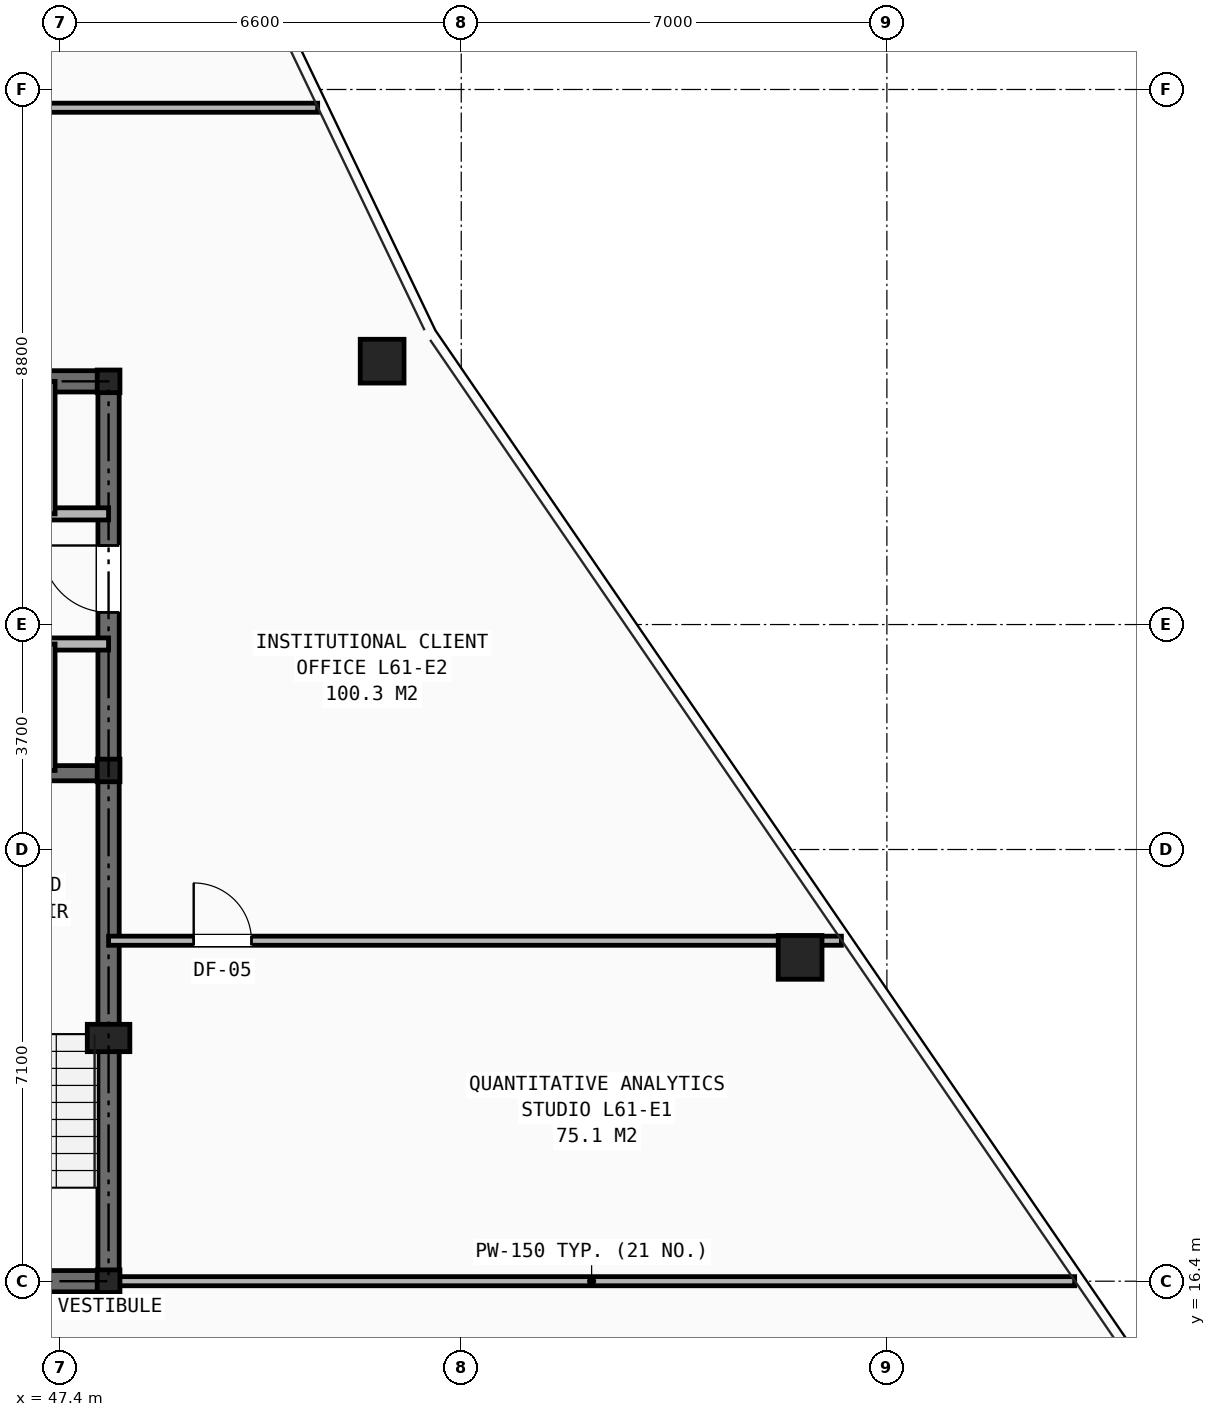
"""IFC4 building model, lengths in metres.
Left out: names, types, materials, properties, quantities, classifications, styles, units other than length and angle.
Written with IfcOpenShell. Run it as: python <this file> out.ifc"""

import sys

from ifc_helpers import new_model, si_unit, direction, frame, frame_2d, origin, origin_2d, place, context, subcontext, project, spatial, rectangle, hollow_rectangle, i_section, extrude, element, fill, save


model = new_model("IFC4")
c1 = context("Model", 3, precision=1e-05, world=origin(), true_north=direction((0.0, 1.0)))
c2 = subcontext(c1, "Body", "Model", "MODEL_VIEW")
j1 = project(units=[si_unit("LENGTHUNIT", "METRE"), si_unit("PLANEANGLEUNIT", "RADIAN")], contexts=[c1])
p1 = place(None, origin())
s1 = spatial("IfcSite", under=j1, at=p1, CompositionType="ELEMENT")
p2 = place(p1, origin())
s2 = spatial("IfcBuilding", under=s1, at=p2, CompositionType="ELEMENT")
p3 = place(p2, frame((0.0, 0.0, 215.4)))
s3 = spatial("IfcBuildingStorey", under=s2, at=p3, CompositionType="ELEMENT", Elevation=215.4)
for number, where, z_axis, x_axis in (
    (1, (48.2, 16.4, 0.0), (0.0, 0.0, 1.0), (1.0, 0.0, 0.0)),
    (2, (48.2, 24.8, 0.0), (0.0, 0.0, 1.0), (1.0, 0.0, 0.0)),
    (3, (48.2, 31.2, 0.0), (0.0, 0.0, 1.0), (1.0, 0.0, 0.0)),
):
    element("IfcColumn", number, at=place(p3, frame(where, z_axis=z_axis, x_axis=x_axis)), inside=s3, PredefinedType="COLUMN", context=c2, shape_type="SweptSolid", body=[
        extrude(i_section(OverallWidth=0.374, OverallDepth=0.372, WebThickness=0.016, FlangeThickness=0.026, at=origin_2d()), origin(), (0.0, 0.0, 1.0), 3.5),
    ])
p4 = place(p3, frame((48.2, 20.4, 0.0), z_axis=(0.0, 0.0, 1.0), x_axis=(1.0, 0.0, 0.0)))
e4 = element("IfcColumn", 4, at=p4, inside=s3, PredefinedType="PILASTER", context=c2, shape_type="SweptSolid", body=[
    extrude(rectangle(XDim=0.7, YDim=0.45, at=origin_2d()), origin(), (0.0, 0.0, 1.0), 3.5),
])
for number, where, z_axis, x_axis in (
    (5, (59.573, 21.726, 0.0), (0.0, 0.0, 1.0), (1.0, 0.0, 0.0)),
    (6, (52.699, 31.532, 0.0), (0.0, 0.0, 1.0), (1.0, 0.0, 0.0)),
):
    element("IfcColumn", number, at=place(p3, frame(where, z_axis=z_axis, x_axis=x_axis)), inside=s3, PredefinedType="COLUMN", context=c2, shape_type="SweptSolid", body=[
        extrude(hollow_rectangle(XDim=0.72, YDim=0.72, WallThickness=0.05, at=origin_2d()), origin(), (0.0, 0.0, 1.0), 3.5),
    ])
p5 = place(p3, frame((31.8, 16.4, 0.0), z_axis=(0.0, 0.0, 1.0), x_axis=(1.0, 0.0, 0.0)))
e7 = element("IfcWall", 7, at=p5, inside=s3, PredefinedType="SHEAR", context=c2, shape_type="SweptSolid", body=[
    extrude(rectangle(XDim=16.4, YDim=0.35, at=frame_2d((8.2, 0.0))), origin(), (0.0, 0.0, 1.0), 3.25),
])
p6 = place(p5, frame((7.75, 0.0, 0.0)))
e8 = element("IfcOpeningElement", 8, at=p6, cuts=e7, PredefinedType="OPENING", context=c2, shape_type="SweptSolid", body=[
    extrude(rectangle(XDim=0.9, YDim=2.1, at=frame_2d((0.45, 1.05))), frame((0.0, 0.185, 0.0), z_axis=(0.0, -1.0, 0.0), x_axis=(1.0, 0.0, 0.0)), (0.0, 0.0, 1.0), 0.37),
])
p7 = place(p5, frame((4.2, 0.0, 0.0)))
e9 = element("IfcOpeningElement", 9, at=p7, cuts=e7, PredefinedType="OPENING", context=c2, shape_type="SweptSolid", body=[
    extrude(rectangle(XDim=0.95, YDim=2.1, at=frame_2d((0.475, 1.05))), frame((0.0, 0.185, 0.0), z_axis=(0.0, -1.0, 0.0), x_axis=(1.0, 0.0, 0.0)), (0.0, 0.0, 1.0), 0.37),
])
p8 = place(p5, frame((10.6, 0.0, 0.0)))
e10 = element("IfcOpeningElement", 10, at=p8, cuts=e7, PredefinedType="OPENING", context=c2, shape_type="SweptSolid", body=[
    extrude(rectangle(XDim=0.95, YDim=2.1, at=frame_2d((0.475, 1.05))), frame((0.0, 0.185, 0.0), z_axis=(0.0, -1.0, 0.0), x_axis=(1.0, 0.0, 0.0)), (0.0, 0.0, 1.0), 0.37),
])
p9 = place(p3, frame((31.8, 31.2, 0.0), z_axis=(0.0, 0.0, 1.0), x_axis=(1.0, 0.0, 0.0)))
e11 = element("IfcWall", 11, at=p9, inside=s3, PredefinedType="SHEAR", context=c2, shape_type="SweptSolid", body=[
    extrude(rectangle(XDim=16.4, YDim=0.35, at=frame_2d((8.2, 0.0))), origin(), (0.0, 0.0, 1.0), 3.25),
])
p10 = place(p3, frame((48.2, 16.4, 0.0), z_axis=(0.0, 0.0, 1.0), x_axis=(0.0, 1.0, 0.0)))
e12 = element("IfcWall", 12, at=p10, inside=s3, PredefinedType="SHEAR", context=c2, shape_type="SweptSolid", body=[
    extrude(rectangle(XDim=14.8, YDim=0.35, at=frame_2d((7.4, 0.0))), origin(), (0.0, 0.0, 1.0), 3.25),
])
p11 = place(p10, frame((11.0, 0.0, 0.0)))
e13 = element("IfcOpeningElement", 13, at=p11, cuts=e12, PredefinedType="OPENING", context=c2, shape_type="SweptSolid", body=[
    extrude(rectangle(XDim=1.1, YDim=2.15, at=frame_2d((0.55, 1.075))), frame((0.0, 0.185, 0.0), z_axis=(0.0, -1.0, 0.0), x_axis=(1.0, 0.0, 0.0)), (0.0, 0.0, 1.0), 0.37),
])
p12 = place(p3, frame((44.955, 24.755, 0.0), z_axis=(0.0, 0.0, 1.0), x_axis=(1.0, 0.0, 0.0)))
e14 = element("IfcWall", 14, at=p12, inside=s3, PredefinedType="SHEAR", context=c2, shape_type="SweptSolid", body=[
    extrude(rectangle(XDim=3.245, YDim=0.25, at=frame_2d((1.623, 0.0))), origin(), (0.0, 0.0, 1.0), 3.25),
])
p13 = place(p3, frame((31.8, 29.02, 0.0), z_axis=(0.0, 0.0, 1.0), x_axis=(1.0, 0.0, 0.0)))
e15 = element("IfcWall", 15, at=p13, inside=s3, PredefinedType="SOLIDWALL", context=c2, shape_type="SweptSolid", body=[
    extrude(rectangle(XDim=16.4, YDim=0.2, at=frame_2d((8.2, 0.0))), origin(), (0.0, 0.0, 1.0), 2.705),
])
p14 = place(p13, frame((0.55, 0.0, 0.0)))
e16 = element("IfcOpeningElement", 16, at=p14, cuts=e15, PredefinedType="OPENING", context=c2, shape_type="SweptSolid", body=[
    extrude(rectangle(XDim=0.85, YDim=2.05, at=frame_2d((0.425, 1.025))), frame((0.0, 0.11, 0.0), z_axis=(0.0, -1.0, 0.0), x_axis=(1.0, 0.0, 0.0)), (0.0, 0.0, 1.0), 0.22),
])
p15 = place(p13, frame((5.94, 0.0, 0.0)))
e17 = element("IfcOpeningElement", 17, at=p15, cuts=e15, PredefinedType="OPENING", context=c2, shape_type="SweptSolid", body=[
    extrude(rectangle(XDim=0.9, YDim=2.1, at=frame_2d((0.45, 1.05))), frame((0.0, 0.11, 0.0), z_axis=(0.0, -1.0, 0.0), x_axis=(1.0, 0.0, 0.0)), (0.0, 0.0, 1.0), 0.22),
])
p16 = place(p13, frame((11.41, 0.0, 0.0)))
e18 = element("IfcOpeningElement", 18, at=p16, cuts=e15, PredefinedType="OPENING", context=c2, shape_type="SweptSolid", body=[
    extrude(rectangle(XDim=1.1, YDim=2.15, at=frame_2d((0.55, 1.075))), frame((0.0, 0.11, 0.0), z_axis=(0.0, -1.0, 0.0), x_axis=(1.0, 0.0, 0.0)), (0.0, 0.0, 1.0), 0.22),
])
p17 = place(p13, frame((13.73, 0.0, 0.0)))
e19 = element("IfcOpeningElement", 19, at=p17, cuts=e15, PredefinedType="OPENING", context=c2, shape_type="SweptSolid", body=[
    extrude(rectangle(XDim=1.1, YDim=2.15, at=frame_2d((0.55, 1.075))), frame((0.0, 0.11, 0.0), z_axis=(0.0, -1.0, 0.0), x_axis=(1.0, 0.0, 0.0)), (0.0, 0.0, 1.0), 0.22),
])
p18 = place(p3, frame((31.8, 26.88, 0.0), z_axis=(0.0, 0.0, 1.0), x_axis=(1.0, 0.0, 0.0)))
e20 = element("IfcWall", 20, at=p18, inside=s3, PredefinedType="SOLIDWALL", context=c2, shape_type="SweptSolid", body=[
    extrude(rectangle(XDim=16.4, YDim=0.2, at=frame_2d((8.2, 0.0))), origin(), (0.0, 0.0, 1.0), 2.705),
])
p19 = place(p18, frame((0.55, 0.0, 0.0)))
e21 = element("IfcOpeningElement", 21, at=p19, cuts=e20, PredefinedType="OPENING", context=c2, shape_type="SweptSolid", body=[
    extrude(rectangle(XDim=0.85, YDim=2.05, at=frame_2d((0.425, 1.025))), frame((0.0, 0.11, 0.0), z_axis=(0.0, -1.0, 0.0), x_axis=(1.0, 0.0, 0.0)), (0.0, 0.0, 1.0), 0.22),
])
p20 = place(p18, frame((5.94, 0.0, 0.0)))
e22 = element("IfcOpeningElement", 22, at=p20, cuts=e20, PredefinedType="OPENING", context=c2, shape_type="SweptSolid", body=[
    extrude(rectangle(XDim=0.9, YDim=2.1, at=frame_2d((0.45, 1.05))), frame((0.0, 0.11, 0.0), z_axis=(0.0, -1.0, 0.0), x_axis=(1.0, 0.0, 0.0)), (0.0, 0.0, 1.0), 0.22),
])
p21 = place(p18, frame((11.41, 0.0, 0.0)))
e23 = element("IfcOpeningElement", 23, at=p21, cuts=e20, PredefinedType="OPENING", context=c2, shape_type="SweptSolid", body=[
    extrude(rectangle(XDim=1.1, YDim=2.15, at=frame_2d((0.55, 1.075))), frame((0.0, 0.11, 0.0), z_axis=(0.0, -1.0, 0.0), x_axis=(1.0, 0.0, 0.0)), (0.0, 0.0, 1.0), 0.22),
])
p22 = place(p18, frame((13.73, 0.0, 0.0)))
e24 = element("IfcOpeningElement", 24, at=p22, cuts=e20, PredefinedType="OPENING", context=c2, shape_type="SweptSolid", body=[
    extrude(rectangle(XDim=1.1, YDim=2.15, at=frame_2d((0.55, 1.075))), frame((0.0, 0.11, 0.0), z_axis=(0.0, -1.0, 0.0), x_axis=(1.0, 0.0, 0.0)), (0.0, 0.0, 1.0), 0.22),
])
p23 = place(p3, frame((47.24, 29.02, 0.0), z_axis=(0.0, 0.0, 1.0), x_axis=(0.0, 1.0, 0.0)))
e25 = element("IfcWall", 25, at=p23, inside=s3, PredefinedType="SOLIDWALL", context=c2, shape_type="SweptSolid", body=[
    extrude(rectangle(XDim=2.18, YDim=0.16, at=frame_2d((1.09, 0.0))), origin(), (0.0, 0.0, 1.0), 2.705),
])
p24 = place(p3, frame((47.24, 24.8, 0.0), z_axis=(0.0, 0.0, 1.0), x_axis=(0.0, 1.0, 0.0)))
e26 = element("IfcWall", 26, at=p24, inside=s3, PredefinedType="SOLIDWALL", context=c2, shape_type="SweptSolid", body=[
    extrude(rectangle(XDim=2.08, YDim=0.16, at=frame_2d((1.04, 0.0))), origin(), (0.0, 0.0, 1.0), 3.25),
])
p25 = place(p3, frame((48.2, 16.4, 0.0), z_axis=(0.0, 0.0, 1.0), x_axis=(1.0, 0.0, 0.0)))
e27 = element("IfcWall", 27, at=p25, inside=s3, PredefinedType="PARTITIONING", context=c2, shape_type="SweptSolid", body=[
    extrude(rectangle(XDim=15.888, YDim=0.15, at=frame_2d((7.944, 0.0))), origin(), (0.0, 0.0, 1.0), 2.292),
])
p26 = place(p3, frame((46.8, 35.7, 0.0), z_axis=(0.0, 0.0, 1.0), x_axis=(1.0, 0.0, 0.0)))
e28 = element("IfcWall", 28, at=p26, inside=s3, PredefinedType="PARTITIONING", context=c2, shape_type="SweptSolid", body=[
    extrude(rectangle(XDim=4.839, YDim=0.15, at=frame_2d((2.419, 0.0))), origin(), (0.0, 0.0, 1.0), 2.628),
])
p27 = place(p3, frame((48.2, 22.0, 0.0), z_axis=(0.0, 0.0, 1.0), x_axis=(1.0, 0.0, 0.0)))
e29 = element("IfcWall", 29, at=p27, inside=s3, PredefinedType="PARTITIONING", context=c2, shape_type="SweptSolid", body=[
    extrude(rectangle(XDim=12.052, YDim=0.15, at=frame_2d((6.026, 0.0))), origin(), (0.0, 0.0, 1.0), 2.292),
])
p28 = place(p27, frame((1.4, 0.0, 0.0)))
e30 = element("IfcOpeningElement", 30, at=p28, cuts=e29, PredefinedType="OPENING", context=c2, shape_type="SweptSolid", body=[
    extrude(rectangle(XDim=0.95, YDim=2.1, at=frame_2d((0.475, 1.05))), frame((0.0, 0.085, 0.0), z_axis=(0.0, -1.0, 0.0), x_axis=(1.0, 0.0, 0.0)), (0.0, 0.0, 1.0), 0.17),
])
p29 = place(p11, origin())
e31 = element("IfcDoor", 31, at=p29, inside=s3, OperationType="SINGLE_SWING_RIGHT", PredefinedType="DOOR", context=c2, shape_type="SweptSolid", body=[
    extrude(rectangle(XDim=1.1, YDim=2.15, at=frame_2d((0.55, 1.075))), frame((0.0, 0.025, 0.0), z_axis=(0.0, -1.0, 0.0), x_axis=(1.0, 0.0, 0.0)), (0.0, 0.0, 1.0), 0.05),
])
fill(e13, e31)
p30 = place(p28, origin())
e32 = element("IfcDoor", 32, at=p30, inside=s3, OperationType="SINGLE_SWING_LEFT", PredefinedType="DOOR", context=c2, shape_type="SweptSolid", body=[
    extrude(rectangle(XDim=0.95, YDim=2.1, at=frame_2d((0.475, 1.05))), frame((0.0, 0.025, 0.0), z_axis=(0.0, -1.0, 0.0), x_axis=(1.0, 0.0, 0.0)), (0.0, 0.0, 1.0), 0.05),
])
fill(e30, e32)
save(model, sys.argv[1])
